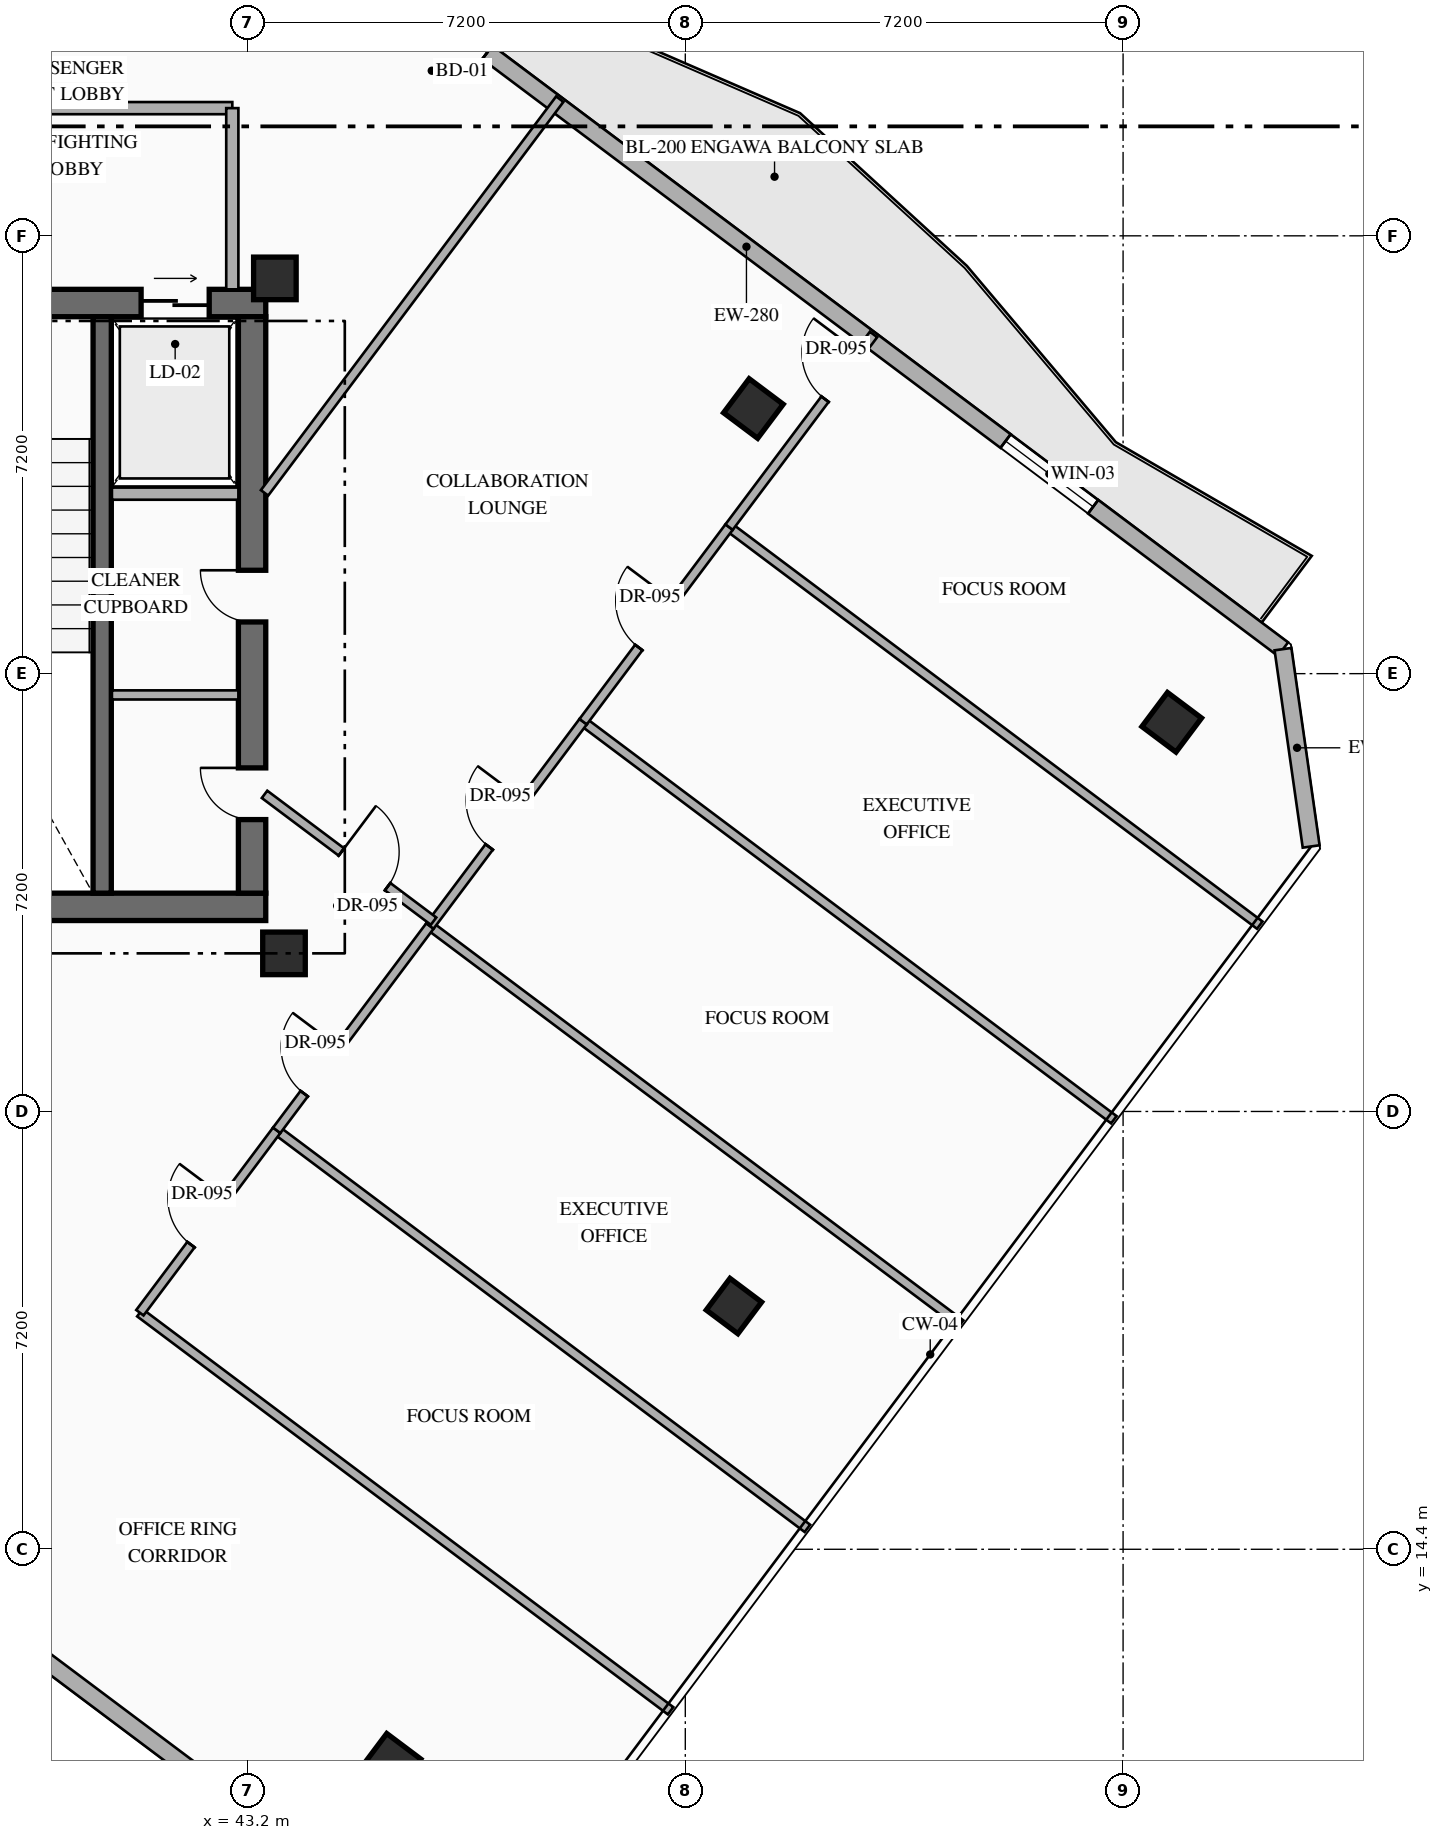
"""IFC4 building model, lengths in metres.
Left out: names, types, materials, properties, quantities, classifications, styles, units other than length and angle.
Written with IfcOpenShell. Run it as: python <this file> out.ifc"""

import sys

from ifc_helpers import new_model, si_unit, direction, frame, frame_2d, origin, origin_2d, place, context, subcontext, project, spatial, rectangle, hollow_rectangle, extrude, element, fill, save


model = new_model("IFC4")
c1 = context("Model", 3, precision=1e-05, world=origin(), true_north=direction((0.0, 1.0)))
c2 = subcontext(c1, "Body", "Model", "MODEL_VIEW")
j1 = project(units=[si_unit("LENGTHUNIT", "METRE"), si_unit("PLANEANGLEUNIT", "RADIAN")], contexts=[c1])
p1 = place(None, origin())
s1 = spatial("IfcSite", under=j1, at=p1, CompositionType="ELEMENT")
p2 = place(p1, origin())
s2 = spatial("IfcBuilding", under=s1, at=p2, CompositionType="ELEMENT")
p3 = place(p2, frame((0.0, 0.0, 223.95)))
s3 = spatial("IfcBuildingStorey", under=s2, at=p3, CompositionType="ELEMENT", Elevation=223.95)
p4 = place(p3, frame((36.04, 24.965, 0.0), z_axis=(0.0, 0.0, 1.0), x_axis=(1.0, 0.0, 0.0)))
e1 = element("IfcWall", 1, at=p4, inside=s3, PredefinedType="SHEAR", context=c2, shape_type="SweptSolid", body=[
    extrude(rectangle(XDim=7.46, YDim=0.45, at=frame_2d((3.73, 0.0))), origin(), (0.0, 0.0, 1.0), 3.6),
])
p5 = place(p3, frame((36.04, 34.895, 0.0), z_axis=(0.0, 0.0, 1.0), x_axis=(1.0, 0.0, 0.0)))
e2 = element("IfcWall", 2, at=p5, inside=s3, PredefinedType="SHEAR", context=c2, shape_type="SweptSolid", body=[
    extrude(rectangle(XDim=7.46, YDim=0.45, at=frame_2d((3.73, 0.0))), origin(), (0.0, 0.0, 1.0), 3.6),
])
p6 = place(p5, frame((2.51, 0.0, 0.0)))
e3 = element("IfcOpeningElement", 3, at=p6, cuts=e2, PredefinedType="OPENING", context=c2, shape_type="SweptSolid", body=[
    extrude(rectangle(XDim=1.1, YDim=2.2, at=frame_2d((0.55, 1.1))), frame((0.0, 0.235, 0.0), z_axis=(0.0, -1.0, 0.0), x_axis=(1.0, 0.0, 0.0)), (0.0, 0.0, 1.0), 0.47),
])
p7 = place(p5, frame((5.41, 0.0, 0.0)))
e4 = element("IfcOpeningElement", 4, at=p7, cuts=e2, PredefinedType="OPENING", context=c2, shape_type="SweptSolid", body=[
    extrude(rectangle(XDim=1.12, YDim=2.15, at=frame_2d((0.56, 1.075))), frame((0.0, 0.235, 0.0), z_axis=(0.0, -1.0, 0.0), x_axis=(1.0, 0.0, 0.0)), (0.0, 0.0, 1.0), 0.47),
])
p8 = place(p3, frame((43.275, 25.19, 0.0), z_axis=(0.0, 0.0, 1.0), x_axis=(0.0, 1.0, 0.0)))
e5 = element("IfcWall", 5, at=p8, inside=s3, PredefinedType="SHEAR", context=c2, shape_type="SweptSolid", body=[
    extrude(rectangle(XDim=9.48, YDim=0.45, at=frame_2d((4.74, 0.0))), origin(), (0.0, 0.0, 1.0), 3.6),
])
p9 = place(p8, frame((1.21, 0.0, 0.0)))
e6 = element("IfcOpeningElement", 6, at=p9, cuts=e5, PredefinedType="OPENING", context=c2, shape_type="SweptSolid", body=[
    extrude(rectangle(XDim=0.85, YDim=2.08, at=frame_2d((0.425, 1.04))), frame((0.0, 0.235, 0.0), z_axis=(0.0, -1.0, 0.0), x_axis=(1.0, 0.0, 0.0)), (0.0, 0.0, 1.0), 0.47),
])
p10 = place(p8, frame((4.46, 0.0, 0.0)))
e7 = element("IfcOpeningElement", 7, at=p10, cuts=e5, PredefinedType="OPENING", context=c2, shape_type="SweptSolid", body=[
    extrude(rectangle(XDim=0.85, YDim=2.08, at=frame_2d((0.425, 1.04))), frame((0.0, 0.235, 0.0), z_axis=(0.0, -1.0, 0.0), x_axis=(1.0, 0.0, 0.0)), (0.0, 0.0, 1.0), 0.47),
])
p11 = place(p3, frame((40.81, 25.19, 0.0), z_axis=(0.0, 0.0, 1.0), x_axis=(0.0, 1.0, 0.0)))
e8 = element("IfcWall", 8, at=p11, inside=s3, PredefinedType="SHEAR", context=c2, shape_type="SweptSolid", body=[
    extrude(rectangle(XDim=9.48, YDim=0.3, at=frame_2d((4.74, 0.0))), origin(), (0.0, 0.0, 1.0), 3.6),
])
for number, where, z_axis, x_axis in (
    (9, (43.8, 24.2, 0.0), (0.0, 0.0, 1.0), (1.0, 0.0, 0.0)),
    (10, (43.65, 35.3, 0.0), (0.0, 0.0, 1.0), (1.0, 0.0, 0.0)),
    (11, (51.52, 33.16, 0.0), (0.0, 0.0, 1.0), (0.8, -0.6, 0.0)),
    (12, (45.56, 10.88, 0.0), (0.0, 0.0, 1.0), (0.8, -0.6, 0.0)),
    (13, (58.4, 28.0, 0.0), (0.0, 0.0, 1.0), (0.8, -0.6, 0.0)),
):
    element("IfcColumn", number, at=place(p3, frame(where, z_axis=z_axis, x_axis=x_axis)), inside=s3, PredefinedType="COLUMN", context=c2, shape_type="SweptSolid", body=[
        extrude(hollow_rectangle(XDim=0.7, YDim=0.7, WallThickness=0.028, at=origin_2d()), origin(), (0.0, 0.0, 1.0), 3.6),
    ])
p12 = place(p3, frame((51.2, 18.4, 0.0), z_axis=(0.0, 0.0, 1.0), x_axis=(0.799999996291, -0.600000004945, 0.0)))
e14 = element("IfcColumn", 14, at=p12, inside=s3, PredefinedType="COLUMN", context=c2, shape_type="SweptSolid", body=[
    extrude(hollow_rectangle(XDim=0.65, YDim=0.65, WallThickness=0.025, at=origin_2d()), origin(), (0.0, 0.0, 1.0), 3.6),
])
p13 = place(p3, frame((44.86, 40.73, 0.0), z_axis=(0.0, 0.0, 1.0), x_axis=(0.800007624502, -0.599989833863, 0.0)))
e15 = element("IfcWall", 15, at=p13, inside=s3, PredefinedType="STANDARD", context=c2, shape_type="SweptSolid", body=[
    extrude(rectangle(XDim=19.212, YDim=0.28, at=frame_2d((9.606, 0.0))), origin(), (0.0, 0.0, 1.0), 3.35),
])
p14 = place(p13, frame((1.755, 0.0, 0.0)))
e16 = element("IfcOpeningElement", 16, at=p14, cuts=e15, PredefinedType="OPENING", context=c2, shape_type="SweptSolid", body=[
    extrude(rectangle(XDim=1.1, YDim=2.2, at=frame_2d((0.55, 1.1))), frame((0.0, 0.15, 0.0), z_axis=(0.0, -1.0, 0.0), x_axis=(1.0, 0.0, 0.0)), (0.0, 0.0, 1.0), 0.3),
])
p15 = place(p13, frame((13.509, 0.0, 0.85)))
e17 = element("IfcOpeningElement", 17, at=p15, cuts=e15, PredefinedType="OPENING", context=c2, shape_type="SweptSolid", body=[
    extrude(rectangle(XDim=1.8, YDim=2.1, at=frame_2d((0.9, 1.05))), frame((0.0, 0.15, 0.0), z_axis=(0.0, -1.0, 0.0), x_axis=(1.0, 0.0, 0.0)), (0.0, 0.0, 1.0), 0.3),
])
p16 = place(p3, frame((60.23, 29.203, 0.0), z_axis=(0.0, 0.0, 1.0), x_axis=(0.141296221922, -0.989967361922, 0.0)))
e18 = element("IfcWall", 18, at=p16, inside=s3, PredefinedType="STANDARD", context=c2, shape_type="SweptSolid", body=[
    extrude(rectangle(XDim=3.278, YDim=0.28, at=frame_2d((1.639, 0.0))), origin(), (0.0, 0.0, 1.0), 3.35),
])
p17 = place(p3, frame((44.918, 8.787, 0.0), z_axis=(0.0, 0.0, 1.0), x_axis=(-0.800004765927, 0.599993645378, 0.0)))
e19 = element("IfcWall", 19, at=p17, inside=s3, PredefinedType="STANDARD", context=c2, shape_type="SweptSolid", body=[
    extrude(rectangle(XDim=24.588, YDim=0.28, at=frame_2d((12.294, 0.0))), origin(), (0.0, 0.0, 1.0), 3.35),
])
p18 = place(p3, frame((40.97, 31.76, 0.0), z_axis=(0.0, 0.0, 1.0), x_axis=(1.0, 0.0, 0.0)))
e20 = element("IfcWall", 20, at=p18, inside=s3, PredefinedType="STANDARD", context=c2, shape_type="SweptSolid", body=[
    extrude(rectangle(XDim=2.08, YDim=0.2, at=frame_2d((1.04, 0.0))), origin(), (0.0, 0.0, 1.0), 3.35),
])
p19 = place(p3, frame((40.97, 28.45, 0.0), z_axis=(0.0, 0.0, 1.0), x_axis=(1.0, 0.0, 0.0)))
e21 = element("IfcWall", 21, at=p19, inside=s3, PredefinedType="PARTITIONING", context=c2, shape_type="SweptSolid", body=[
    extrude(rectangle(XDim=2.08, YDim=0.15, at=frame_2d((1.04, 0.0))), origin(), (0.0, 0.0, 1.0), 3.35),
])
p20 = place(p3, frame((37.65, 38.1, 0.0), z_axis=(0.0, 0.0, 1.0), x_axis=(1.0, 0.0, 0.0)))
e22 = element("IfcWall", 22, at=p20, inside=s3, PredefinedType="STANDARD", context=c2, shape_type="SweptSolid", body=[
    extrude(rectangle(XDim=5.3, YDim=0.2, at=frame_2d((2.65, 0.0))), origin(), (0.0, 0.0, 1.0), 3.35),
])
p21 = place(p3, frame((42.95, 35.12, 0.0), z_axis=(0.0, 0.0, 1.0), x_axis=(0.0, 1.0, 0.0)))
e23 = element("IfcWall", 23, at=p21, inside=s3, PredefinedType="STANDARD", context=c2, shape_type="SweptSolid", body=[
    extrude(rectangle(XDim=2.98, YDim=0.2, at=frame_2d((1.49, 0.0))), origin(), (0.0, 0.0, 1.0), 3.35),
])
for number, where, z_axis, x_axis in (
    (24, (41.43, 18.29, 0.0), (0.0, 0.0, 1.0), (0.8, -0.6, 0.0)),
    (25, (43.68, 21.29, 0.0), (0.0, 0.0, 1.0), (0.8, -0.6, 0.0)),
):
    element("IfcWall", number, at=place(p3, frame(where, z_axis=z_axis, x_axis=x_axis)), inside=s3, PredefinedType="PARTITIONING", context=c2, shape_type="SweptSolid", body=[
        extrude(rectangle(XDim=10.91, YDim=0.15, at=frame_2d((5.455, 0.0))), origin(), (0.0, 0.0, 1.0), 3.35),
    ])
p22 = place(p3, frame((41.43, 18.29, 0.0), z_axis=(0.0, 0.0, 1.0), x_axis=(0.6, 0.8, 0.0)))
e26 = element("IfcWall", 26, at=p22, inside=s3, PredefinedType="PARTITIONING", context=c2, shape_type="SweptSolid", body=[
    extrude(rectangle(XDim=3.75, YDim=0.15, at=frame_2d((1.875, 0.0))), origin(), (0.0, 0.0, 1.0), 3.35),
])
p23 = place(p22, frame((1.4, 0.0, 0.0)))
e27 = element("IfcOpeningElement", 27, at=p23, cuts=e26, PredefinedType="OPENING", context=c2, shape_type="SweptSolid", body=[
    extrude(rectangle(XDim=0.95, YDim=2.15, at=frame_2d((0.475, 1.075))), frame((0.0, 0.085, 0.0), z_axis=(0.0, -1.0, 0.0), x_axis=(1.0, 0.0, 0.0)), (0.0, 0.0, 1.0), 0.17),
])
p24 = place(p3, frame((46.2, 24.65, 0.0), z_axis=(0.0, 0.0, 1.0), x_axis=(0.800005370633, -0.599992839089, 0.0)))
e28 = element("IfcWall", 28, at=p24, inside=s3, PredefinedType="PARTITIONING", context=c2, shape_type="SweptSolid", body=[
    extrude(rectangle(XDim=10.91, YDim=0.15, at=frame_2d((5.455, 0.0))), origin(), (0.0, 0.0, 1.0), 3.35),
])
p25 = place(p3, frame((43.68, 21.29, 0.0), z_axis=(0.0, 0.0, 1.0), x_axis=(0.600018601461, 0.799986048566, 0.0)))
e29 = element("IfcWall", 29, at=p25, inside=s3, PredefinedType="PARTITIONING", context=c2, shape_type="SweptSolid", body=[
    extrude(rectangle(XDim=4.2, YDim=0.15, at=frame_2d((2.1, 0.0))), origin(), (0.0, 0.0, 1.0), 3.35),
])
p26 = place(p25, frame((0.754, 0.0, 0.0)))
e30 = element("IfcOpeningElement", 30, at=p26, cuts=e29, PredefinedType="OPENING", context=c2, shape_type="SweptSolid", body=[
    extrude(rectangle(XDim=0.95, YDim=2.15, at=frame_2d((0.475, 1.075))), frame((0.0, 0.085, 0.0), z_axis=(0.0, -1.0, 0.0), x_axis=(1.0, 0.0, 0.0)), (0.0, 0.0, 1.0), 0.17),
])
p27 = place(p3, frame((48.72, 28.01, 0.0), z_axis=(0.0, 0.0, 1.0), x_axis=(0.800005370633, -0.599992839089, 0.0)))
e31 = element("IfcWall", 31, at=p27, inside=s3, PredefinedType="PARTITIONING", context=c2, shape_type="SweptSolid", body=[
    extrude(rectangle(XDim=10.91, YDim=0.15, at=frame_2d((5.455, 0.0))), origin(), (0.0, 0.0, 1.0), 3.35),
])
p28 = place(p3, frame((46.2, 24.65, 0.0), z_axis=(0.0, 0.0, 1.0), x_axis=(0.59999069958, 0.80000697523, 0.0)))
e32 = element("IfcWall", 32, at=p28, inside=s3, PredefinedType="PARTITIONING", context=c2, shape_type="SweptSolid", body=[
    extrude(rectangle(XDim=4.2, YDim=0.15, at=frame_2d((2.1, 0.0))), origin(), (0.0, 0.0, 1.0), 3.35),
])
p29 = place(p28, frame((1.625, 0.0, 0.0)))
e33 = element("IfcOpeningElement", 33, at=p29, cuts=e32, PredefinedType="OPENING", context=c2, shape_type="SweptSolid", body=[
    extrude(rectangle(XDim=0.95, YDim=2.15, at=frame_2d((0.475, 1.075))), frame((0.0, 0.085, 0.0), z_axis=(0.0, -1.0, 0.0), x_axis=(1.0, 0.0, 0.0)), (0.0, 0.0, 1.0), 0.17),
])
p30 = place(p3, frame((51.12, 31.21, 0.0), z_axis=(0.0, 0.0, 1.0), x_axis=(0.799997314611, -0.600003580502, 0.0)))
e34 = element("IfcWall", 34, at=p30, inside=s3, PredefinedType="PARTITIONING", context=c2, shape_type="SweptSolid", body=[
    extrude(rectangle(XDim=10.91, YDim=0.15, at=frame_2d((5.455, 0.0))), origin(), (0.0, 0.0, 1.0), 3.045),
])
p31 = place(p3, frame((48.72, 28.01, 0.0), z_axis=(0.0, 0.0, 1.0), x_axis=(0.600029296115, 0.799978027076, 0.0)))
e35 = element("IfcWall", 35, at=p31, inside=s3, PredefinedType="PARTITIONING", context=c2, shape_type="SweptSolid", body=[
    extrude(rectangle(XDim=4.0, YDim=0.15, at=frame_2d((2.0, 0.0))), origin(), (0.0, 0.0, 1.0), 3.35),
])
p32 = place(p31, frame((1.525, 0.0, 0.0)))
e36 = element("IfcOpeningElement", 36, at=p32, cuts=e35, PredefinedType="OPENING", context=c2, shape_type="SweptSolid", body=[
    extrude(rectangle(XDim=0.95, YDim=2.15, at=frame_2d((0.475, 1.075))), frame((0.0, 0.085, 0.0), z_axis=(0.0, -1.0, 0.0), x_axis=(1.0, 0.0, 0.0)), (0.0, 0.0, 1.0), 0.17),
])
p33 = place(p3, frame((51.12, 31.21, 0.0), z_axis=(0.0, 0.0, 1.0), x_axis=(0.6, 0.8, 0.0)))
e37 = element("IfcWall", 37, at=p33, inside=s3, PredefinedType="PARTITIONING", context=c2, shape_type="SweptSolid", body=[
    extrude(rectangle(XDim=3.96, YDim=0.15, at=frame_2d((1.98, 0.0))), origin(), (0.0, 0.0, 1.0), 3.35),
])
p34 = place(p33, frame((2.63, 0.0, 0.0)))
e38 = element("IfcOpeningElement", 38, at=p34, cuts=e37, PredefinedType="OPENING", context=c2, shape_type="SweptSolid", body=[
    extrude(rectangle(XDim=0.95, YDim=2.15, at=frame_2d((0.475, 1.075))), frame((0.0, 0.085, 0.0), z_axis=(0.0, -1.0, 0.0), x_axis=(1.0, 0.0, 0.0)), (0.0, 0.0, 1.0), 0.17),
])
p35 = place(p3, frame((43.48, 26.815, 0.0), z_axis=(0.0, 0.0, 1.0), x_axis=(0.800008430676, -0.599988758934, 0.0)))
e39 = element("IfcWall", 39, at=p35, inside=s3, PredefinedType="PARTITIONING", context=c2, shape_type="SweptSolid", body=[
    extrude(rectangle(XDim=3.475, YDim=0.15, at=frame_2d((1.738, 0.0))), origin(), (0.0, 0.0, 1.0), 3.35),
])
p36 = place(p35, frame((1.58, 0.0, 0.0)))
e40 = element("IfcOpeningElement", 40, at=p36, cuts=e39, PredefinedType="OPENING", context=c2, shape_type="SweptSolid", body=[
    extrude(rectangle(XDim=0.95, YDim=2.15, at=frame_2d((0.475, 1.075))), frame((0.0, 0.085, 0.0), z_axis=(0.0, -1.0, 0.0), x_axis=(1.0, 0.0, 0.0)), (0.0, 0.0, 1.0), 0.17),
])
p37 = place(p3, frame((43.48, 31.773, 0.0), z_axis=(0.0, 0.0, 1.0), x_axis=(0.599971041729, 0.800021717885, 0.0)))
e41 = element("IfcWall", 41, at=p37, inside=s3, PredefinedType="PARTITIONING", context=c2, shape_type="SweptSolid", body=[
    extrude(rectangle(XDim=8.094, YDim=0.15, at=frame_2d((4.047, 0.0))), origin(), (0.0, 0.0, 1.0), 3.35),
])
p38 = place(p14, origin())
e42 = element("IfcDoor", 42, at=p38, inside=s3, OperationType="SINGLE_SWING_LEFT", PredefinedType="DOOR", context=c2, shape_type="SweptSolid", body=[
    extrude(rectangle(XDim=1.1, YDim=2.2, at=frame_2d((0.55, 1.1))), frame((0.0, 0.025, 0.0), z_axis=(0.0, -1.0, 0.0), x_axis=(1.0, 0.0, 0.0)), (0.0, 0.0, 1.0), 0.05),
])
fill(e16, e42)
p39 = place(p15, origin())
e43 = element("IfcWindow", 43, at=p39, inside=s3, PartitioningType="SINGLE_PANEL", PredefinedType="WINDOW", context=c2, shape_type="SweptSolid", body=[
    extrude(rectangle(XDim=1.8, YDim=2.1, at=frame_2d((0.9, 1.05))), frame((0.0, 0.03, 0.0), z_axis=(0.0, -1.0, 0.0), x_axis=(1.0, 0.0, 0.0)), (0.0, 0.0, 1.0), 0.06),
])
fill(e17, e43)
p40 = place(p7, origin())
e44 = element("IfcDoor", 44, at=p40, inside=s3, OperationType="SLIDING_TO_RIGHT", PredefinedType="USERDEFINED", context=c2, shape_type="SweptSolid", body=[
    extrude(rectangle(XDim=1.12, YDim=2.15, at=frame_2d((0.56, 1.075))), frame((0.0, 0.025, 0.0), z_axis=(0.0, -1.0, 0.0), x_axis=(1.0, 0.0, 0.0)), (0.0, 0.0, 1.0), 0.05),
])
fill(e4, e44)
p41 = place(p9, origin())
e45 = element("IfcDoor", 45, at=p41, inside=s3, OperationType="SINGLE_SWING_RIGHT", PredefinedType="DOOR", context=c2, shape_type="SweptSolid", body=[
    extrude(rectangle(XDim=0.85, YDim=2.08, at=frame_2d((0.425, 1.04))), frame((0.0, 0.025, 0.0), z_axis=(0.0, -1.0, 0.0), x_axis=(1.0, 0.0, 0.0)), (0.0, 0.0, 1.0), 0.05),
])
fill(e6, e45)
p42 = place(p10, origin())
e46 = element("IfcDoor", 46, at=p42, inside=s3, OperationType="SINGLE_SWING_RIGHT", PredefinedType="DOOR", context=c2, shape_type="SweptSolid", body=[
    extrude(rectangle(XDim=0.85, YDim=2.08, at=frame_2d((0.425, 1.04))), frame((0.0, 0.025, 0.0), z_axis=(0.0, -1.0, 0.0), x_axis=(1.0, 0.0, 0.0)), (0.0, 0.0, 1.0), 0.05),
])
fill(e7, e46)
p43 = place(p23, origin())
e47 = element("IfcDoor", 47, at=p43, inside=s3, OperationType="SINGLE_SWING_RIGHT", PredefinedType="DOOR", context=c2, shape_type="SweptSolid", body=[
    extrude(rectangle(XDim=0.95, YDim=2.15, at=frame_2d((0.475, 1.075))), frame((0.0, 0.025, 0.0), z_axis=(0.0, -1.0, 0.0), x_axis=(1.0, 0.0, 0.0)), (0.0, 0.0, 1.0), 0.05),
])
fill(e27, e47)
p44 = place(p26, origin())
e48 = element("IfcDoor", 48, at=p44, inside=s3, OperationType="SINGLE_SWING_RIGHT", PredefinedType="DOOR", context=c2, shape_type="SweptSolid", body=[
    extrude(rectangle(XDim=0.95, YDim=2.15, at=frame_2d((0.475, 1.075))), frame((0.0, 0.025, 0.0), z_axis=(0.0, -1.0, 0.0), x_axis=(1.0, 0.0, 0.0)), (0.0, 0.0, 1.0), 0.05),
])
fill(e30, e48)
p45 = place(p29, origin())
e49 = element("IfcDoor", 49, at=p45, inside=s3, OperationType="SINGLE_SWING_RIGHT", PredefinedType="DOOR", context=c2, shape_type="SweptSolid", body=[
    extrude(rectangle(XDim=0.95, YDim=2.15, at=frame_2d((0.475, 1.075))), frame((0.0, 0.025, 0.0), z_axis=(0.0, -1.0, 0.0), x_axis=(1.0, 0.0, 0.0)), (0.0, 0.0, 1.0), 0.05),
])
fill(e33, e49)
p46 = place(p32, origin())
e50 = element("IfcDoor", 50, at=p46, inside=s3, OperationType="SINGLE_SWING_RIGHT", PredefinedType="DOOR", context=c2, shape_type="SweptSolid", body=[
    extrude(rectangle(XDim=0.95, YDim=2.15, at=frame_2d((0.475, 1.075))), frame((0.0, 0.025, 0.0), z_axis=(0.0, -1.0, 0.0), x_axis=(1.0, 0.0, 0.0)), (0.0, 0.0, 1.0), 0.05),
])
fill(e36, e50)
p47 = place(p34, origin())
e51 = element("IfcDoor", 51, at=p47, inside=s3, OperationType="SINGLE_SWING_RIGHT", PredefinedType="DOOR", context=c2, shape_type="SweptSolid", body=[
    extrude(rectangle(XDim=0.95, YDim=2.15, at=frame_2d((0.475, 1.075))), frame((0.0, 0.025, 0.0), z_axis=(0.0, -1.0, 0.0), x_axis=(1.0, 0.0, 0.0)), (0.0, 0.0, 1.0), 0.05),
])
fill(e38, e51)
p48 = place(p36, origin())
e52 = element("IfcDoor", 52, at=p48, inside=s3, OperationType="SINGLE_SWING_LEFT", PredefinedType="DOOR", context=c2, shape_type="SweptSolid", body=[
    extrude(rectangle(XDim=0.95, YDim=2.15, at=frame_2d((0.475, 1.075))), frame((0.0, 0.025, 0.0), z_axis=(0.0, -1.0, 0.0), x_axis=(1.0, 0.0, 0.0)), (0.0, 0.0, 1.0), 0.05),
])
fill(e40, e52)
save(model, sys.argv[1])
